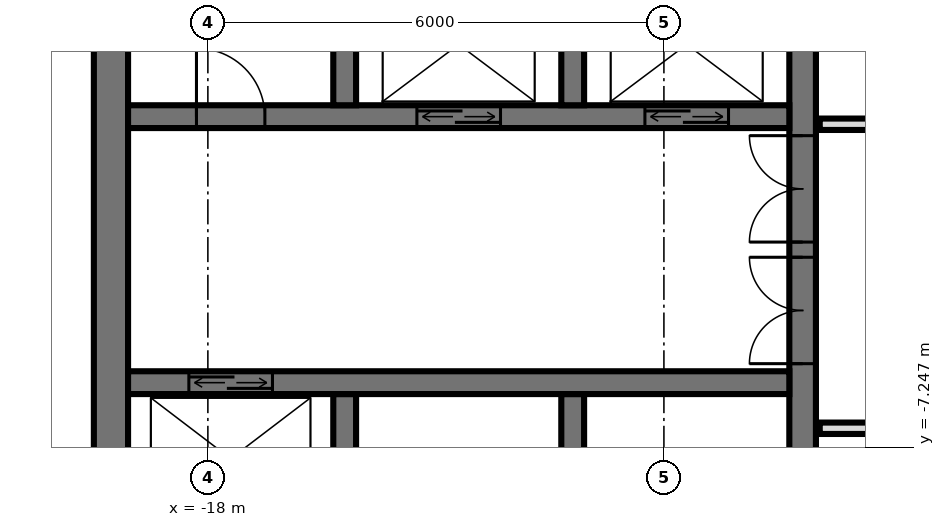
"""IFC4 building model, lengths in metres.
Left out: names, types, materials, properties, quantities, classifications, styles, units other than length and angle.
Written with IfcOpenShell. Run it as: python <this file> out.ifc"""

import sys

from ifc_helpers import new_model, si_unit, direction, frame, frame_2d, origin, place, context, subcontext, project, spatial, rectangle, extrude, element, fill, save


model = new_model("IFC4")
c1 = context("Model", 3, precision=1e-05, world=origin(), true_north=direction((0.0, 1.0)))
c2 = subcontext(c1, "Body", "Model", "MODEL_VIEW")
j1 = project(units=[si_unit("LENGTHUNIT", "METRE"), si_unit("PLANEANGLEUNIT", "RADIAN")], contexts=[c1])
p1 = place(None, origin())
s1 = spatial("IfcSite", under=j1, at=p1, CompositionType="ELEMENT")
p2 = place(p1, origin())
s2 = spatial("IfcBuilding", under=s1, at=p2, CompositionType="ELEMENT")
p3 = place(p2, frame((0.0, 0.0, 266.6)))
s3 = spatial("IfcBuildingStorey", under=s2, at=p3, CompositionType="ELEMENT", Elevation=266.6)
p4 = place(p3, frame((-10.175, -14.55, 0.0), z_axis=(0.0, 0.0, 1.0), x_axis=(0.0, 1.0, 0.0)))
e1 = element("IfcWall", 1, at=p4, inside=s3, PredefinedType="SHEAR", context=c2, shape_type="SweptSolid", body=[
    extrude(rectangle(XDim=14.1, YDim=0.35, at=frame_2d((7.05, 0.0))), origin(), (0.0, 0.0, 1.0), 3.5),
])
p5 = place(p4, frame((8.4, 0.0, 0.0)))
e2 = element("IfcOpeningElement", 2, at=p5, cuts=e1, PredefinedType="OPENING", context=c2, shape_type="SweptSolid", body=[
    extrude(rectangle(XDim=1.4, YDim=2.4, at=frame_2d((0.7, 1.2))), frame((0.0, 0.185, 0.0), z_axis=(0.0, -1.0, 0.0), x_axis=(1.0, 0.0, 0.0)), (0.0, 0.0, 1.0), 0.37),
])
p6 = place(p4, frame((10.0, 0.0, 0.0)))
e3 = element("IfcOpeningElement", 3, at=p6, cuts=e1, PredefinedType="OPENING", context=c2, shape_type="SweptSolid", body=[
    extrude(rectangle(XDim=1.4, YDim=2.4, at=frame_2d((0.7, 1.2))), frame((0.0, 0.185, 0.0), z_axis=(0.0, -1.0, 0.0), x_axis=(1.0, 0.0, 0.0)), (0.0, 0.0, 1.0), 0.37),
])
p7 = place(p4, frame((4.0, 0.0, 0.0)))
e4 = element("IfcOpeningElement", 4, at=p7, cuts=e1, PredefinedType="OPENING", context=c2, shape_type="SweptSolid", body=[
    extrude(rectangle(XDim=1.2, YDim=2.1, at=frame_2d((0.6, 1.05))), frame((0.0, 0.185, 0.0), z_axis=(0.0, -1.0, 0.0), x_axis=(1.0, 0.0, 0.0)), (0.0, 0.0, 1.0), 0.37),
])
p8 = place(p3, frame((-19.275, -14.55, 0.0), z_axis=(0.0, 0.0, 1.0), x_axis=(0.0, 1.0, 0.0)))
e5 = element("IfcWall", 5, at=p8, inside=s3, PredefinedType="SHEAR", context=c2, shape_type="SweptSolid", body=[
    extrude(rectangle(XDim=14.1, YDim=0.45, at=frame_2d((7.05, 0.0))), origin(), (0.0, 0.0, 1.0), 3.5),
])
p9 = place(p3, frame((-19.05, -2.9, 0.0), z_axis=(0.0, 0.0, 1.0), x_axis=(1.0, 0.0, 0.0)))
e6 = element("IfcWall", 6, at=p9, inside=s3, PredefinedType="SHEAR", context=c2, shape_type="SweptSolid", body=[
    extrude(rectangle(XDim=8.7, YDim=0.3, at=frame_2d((4.35, 0.0))), origin(), (0.0, 0.0, 1.0), 3.5),
])
p10 = place(p9, frame((6.8, 0.0, 0.0)))
e7 = element("IfcOpeningElement", 7, at=p10, cuts=e6, PredefinedType="OPENING", context=c2, shape_type="SweptSolid", body=[
    extrude(rectangle(XDim=1.1, YDim=2.1, at=frame_2d((0.55, 1.05))), frame((0.0, 0.16, 0.0), z_axis=(0.0, -1.0, 0.0), x_axis=(1.0, 0.0, 0.0)), (0.0, 0.0, 1.0), 0.32),
])
p11 = place(p9, frame((3.8, 0.0, 0.0)))
e8 = element("IfcOpeningElement", 8, at=p11, cuts=e6, PredefinedType="OPENING", context=c2, shape_type="SweptSolid", body=[
    extrude(rectangle(XDim=1.1, YDim=2.1, at=frame_2d((0.55, 1.05))), frame((0.0, 0.16, 0.0), z_axis=(0.0, -1.0, 0.0), x_axis=(1.0, 0.0, 0.0)), (0.0, 0.0, 1.0), 0.32),
])
p12 = place(p9, frame((0.9, 0.0, 0.0)))
e9 = element("IfcOpeningElement", 9, at=p12, cuts=e6, PredefinedType="OPENING", context=c2, shape_type="SweptSolid", body=[
    extrude(rectangle(XDim=0.9, YDim=2.1, at=frame_2d((0.45, 1.05))), frame((0.0, 0.16, 0.0), z_axis=(0.0, -1.0, 0.0), x_axis=(1.0, 0.0, 0.0)), (0.0, 0.0, 1.0), 0.32),
])
p13 = place(p3, frame((-19.05, -6.4, 0.0), z_axis=(0.0, 0.0, 1.0), x_axis=(1.0, 0.0, 0.0)))
e10 = element("IfcWall", 10, at=p13, inside=s3, PredefinedType="SHEAR", context=c2, shape_type="SweptSolid", body=[
    extrude(rectangle(XDim=8.7, YDim=0.3, at=frame_2d((4.35, 0.0))), origin(), (0.0, 0.0, 1.0), 3.5),
])
p14 = place(p13, frame((0.8, 0.0, 0.0)))
e11 = element("IfcOpeningElement", 11, at=p14, cuts=e10, PredefinedType="OPENING", context=c2, shape_type="SweptSolid", body=[
    extrude(rectangle(XDim=1.1, YDim=2.1, at=frame_2d((0.55, 1.05))), frame((0.0, 0.16, 0.0), z_axis=(0.0, -1.0, 0.0), x_axis=(1.0, 0.0, 0.0)), (0.0, 0.0, 1.0), 0.32),
])
for number, where, z_axis, x_axis in (
    (12, (-13.2, -2.75, 0.0), (0.0, 0.0, 1.0), (0.0, 1.0, 0.0)),
    (13, (-13.2, -8.85, 0.0), (0.0, 0.0, 1.0), (0.0, 1.0, 0.0)),
    (14, (-16.2, -2.75, 0.0), (0.0, 0.0, 1.0), (0.0, 1.0, 0.0)),
    (15, (-16.2, -8.85, 0.0), (0.0, 0.0, 1.0), (0.0, 1.0, 0.0)),
):
    element("IfcWall", number, at=place(p3, frame(where, z_axis=z_axis, x_axis=x_axis)), inside=s3, PredefinedType="SHEAR", context=c2, shape_type="SweptSolid", body=[
        extrude(rectangle(XDim=2.3, YDim=0.3, at=frame_2d((1.15, 0.0))), origin(), (0.0, 0.0, 1.0), 3.5),
    ])
p15 = place(p3, frame((-9.95, -7.0, 0.0), z_axis=(0.0, 0.0, 1.0), x_axis=(1.0, 0.0, 0.0)))
e16 = element("IfcWall", 16, at=p15, inside=s3, PredefinedType="PARTITIONING", context=c2, shape_type="SweptSolid", body=[
    extrude(rectangle(XDim=19.9, YDim=0.15, at=frame_2d((9.95, 0.0))), origin(), (0.0, 0.0, 1.0), 3.22),
])
p16 = place(p15, frame((9.45, 0.0, 0.0)))
e17 = element("IfcOpeningElement", 17, at=p16, cuts=e16, PredefinedType="OPENING", context=c2, shape_type="SweptSolid", body=[
    extrude(rectangle(XDim=1.0, YDim=2.1, at=frame_2d((0.5, 1.05))), frame((0.0, 0.085, 0.0), z_axis=(0.0, -1.0, 0.0), x_axis=(1.0, 0.0, 0.0)), (0.0, 0.0, 1.0), 0.17),
])
p17 = place(p15, frame((15.45, 0.0, 0.0)))
e18 = element("IfcOpeningElement", 18, at=p17, cuts=e16, PredefinedType="OPENING", context=c2, shape_type="SweptSolid", body=[
    extrude(rectangle(XDim=1.0, YDim=2.1, at=frame_2d((0.5, 1.05))), frame((0.0, 0.085, 0.0), z_axis=(0.0, -1.0, 0.0), x_axis=(1.0, 0.0, 0.0)), (0.0, 0.0, 1.0), 0.17),
])
p18 = place(p3, frame((-9.95, -3.0, 0.0), z_axis=(0.0, 0.0, 1.0), x_axis=(1.0, 0.0, 0.0)))
e19 = element("IfcWall", 19, at=p18, inside=s3, PredefinedType="PARTITIONING", context=c2, shape_type="SweptSolid", body=[
    extrude(rectangle(XDim=19.9, YDim=0.15, at=frame_2d((9.95, 0.0))), origin(), (0.0, 0.0, 1.0), 3.22),
])
p19 = place(p18, frame((1.7, 0.0, 0.0)))
e20 = element("IfcOpeningElement", 20, at=p19, cuts=e19, PredefinedType="OPENING", context=c2, shape_type="SweptSolid", body=[
    extrude(rectangle(XDim=1.0, YDim=2.1, at=frame_2d((0.5, 1.05))), frame((0.0, 0.085, 0.0), z_axis=(0.0, -1.0, 0.0), x_axis=(1.0, 0.0, 0.0)), (0.0, 0.0, 1.0), 0.17),
])
p20 = place(p18, frame((5.45, 0.0, 0.0)))
e21 = element("IfcOpeningElement", 21, at=p20, cuts=e19, PredefinedType="OPENING", context=c2, shape_type="SweptSolid", body=[
    extrude(rectangle(XDim=1.0, YDim=2.1, at=frame_2d((0.5, 1.05))), frame((0.0, 0.085, 0.0), z_axis=(0.0, -1.0, 0.0), x_axis=(1.0, 0.0, 0.0)), (0.0, 0.0, 1.0), 0.17),
])
p21 = place(p18, frame((8.2, 0.0, 0.0)))
e22 = element("IfcOpeningElement", 22, at=p21, cuts=e19, PredefinedType="OPENING", context=c2, shape_type="SweptSolid", body=[
    extrude(rectangle(XDim=1.0, YDim=2.1, at=frame_2d((0.5, 1.05))), frame((0.0, 0.085, 0.0), z_axis=(0.0, -1.0, 0.0), x_axis=(1.0, 0.0, 0.0)), (0.0, 0.0, 1.0), 0.17),
])
p22 = place(p18, frame((11.95, 0.0, 0.0)))
e23 = element("IfcOpeningElement", 23, at=p22, cuts=e19, PredefinedType="OPENING", context=c2, shape_type="SweptSolid", body=[
    extrude(rectangle(XDim=1.0, YDim=2.1, at=frame_2d((0.5, 1.05))), frame((0.0, 0.085, 0.0), z_axis=(0.0, -1.0, 0.0), x_axis=(1.0, 0.0, 0.0)), (0.0, 0.0, 1.0), 0.17),
])
p23 = place(p18, frame((16.95, 0.0, 0.0)))
e24 = element("IfcOpeningElement", 24, at=p23, cuts=e19, PredefinedType="OPENING", context=c2, shape_type="SweptSolid", body=[
    extrude(rectangle(XDim=1.0, YDim=2.1, at=frame_2d((0.5, 1.05))), frame((0.0, 0.085, 0.0), z_axis=(0.0, -1.0, 0.0), x_axis=(1.0, 0.0, 0.0)), (0.0, 0.0, 1.0), 0.17),
])
p24 = place(p10, origin())
e25 = element("IfcDoor", 25, at=p24, inside=s3, OperationType="DOUBLE_DOOR_SLIDING", PredefinedType="USERDEFINED", context=c2, shape_type="SweptSolid", body=[
    extrude(rectangle(XDim=1.1, YDim=2.1, at=frame_2d((0.55, 1.05))), frame((0.0, 0.025, 0.0), z_axis=(0.0, -1.0, 0.0), x_axis=(1.0, 0.0, 0.0)), (0.0, 0.0, 1.0), 0.05),
])
fill(e7, e25)
p25 = place(p11, origin())
e26 = element("IfcDoor", 26, at=p25, inside=s3, OperationType="DOUBLE_DOOR_SLIDING", PredefinedType="USERDEFINED", context=c2, shape_type="SweptSolid", body=[
    extrude(rectangle(XDim=1.1, YDim=2.1, at=frame_2d((0.55, 1.05))), frame((0.0, 0.025, 0.0), z_axis=(0.0, -1.0, 0.0), x_axis=(1.0, 0.0, 0.0)), (0.0, 0.0, 1.0), 0.05),
])
fill(e8, e26)
p26 = place(p14, origin())
e27 = element("IfcDoor", 27, at=p26, inside=s3, OperationType="DOUBLE_DOOR_SLIDING", PredefinedType="USERDEFINED", context=c2, shape_type="SweptSolid", body=[
    extrude(rectangle(XDim=1.1, YDim=2.1, at=frame_2d((0.55, 1.05))), frame((0.0, 0.025, 0.0), z_axis=(0.0, -1.0, 0.0), x_axis=(1.0, 0.0, 0.0)), (0.0, 0.0, 1.0), 0.05),
])
fill(e11, e27)
p27 = place(p5, origin())
e28 = element("IfcDoor", 28, at=p27, inside=s3, OperationType="DOUBLE_DOOR_SINGLE_SWING", PredefinedType="DOOR", context=c2, shape_type="SweptSolid", body=[
    extrude(rectangle(XDim=1.4, YDim=2.4, at=frame_2d((0.7, 1.2))), frame((0.0, 0.025, 0.0), z_axis=(0.0, -1.0, 0.0), x_axis=(1.0, 0.0, 0.0)), (0.0, 0.0, 1.0), 0.05),
])
fill(e2, e28)
p28 = place(p6, origin())
e29 = element("IfcDoor", 29, at=p28, inside=s3, OperationType="DOUBLE_DOOR_SINGLE_SWING", PredefinedType="DOOR", context=c2, shape_type="SweptSolid", body=[
    extrude(rectangle(XDim=1.4, YDim=2.4, at=frame_2d((0.7, 1.2))), frame((0.0, 0.025, 0.0), z_axis=(0.0, -1.0, 0.0), x_axis=(1.0, 0.0, 0.0)), (0.0, 0.0, 1.0), 0.05),
])
fill(e3, e29)
p29 = place(p12, origin())
e30 = element("IfcDoor", 30, at=p29, inside=s3, OperationType="SINGLE_SWING_RIGHT", PredefinedType="DOOR", context=c2, shape_type="SweptSolid", body=[
    extrude(rectangle(XDim=0.9, YDim=2.1, at=frame_2d((0.45, 1.05))), frame((0.0, 0.025, 0.0), z_axis=(0.0, -1.0, 0.0), x_axis=(1.0, 0.0, 0.0)), (0.0, 0.0, 1.0), 0.05),
])
fill(e9, e30)
save(model, sys.argv[1])
